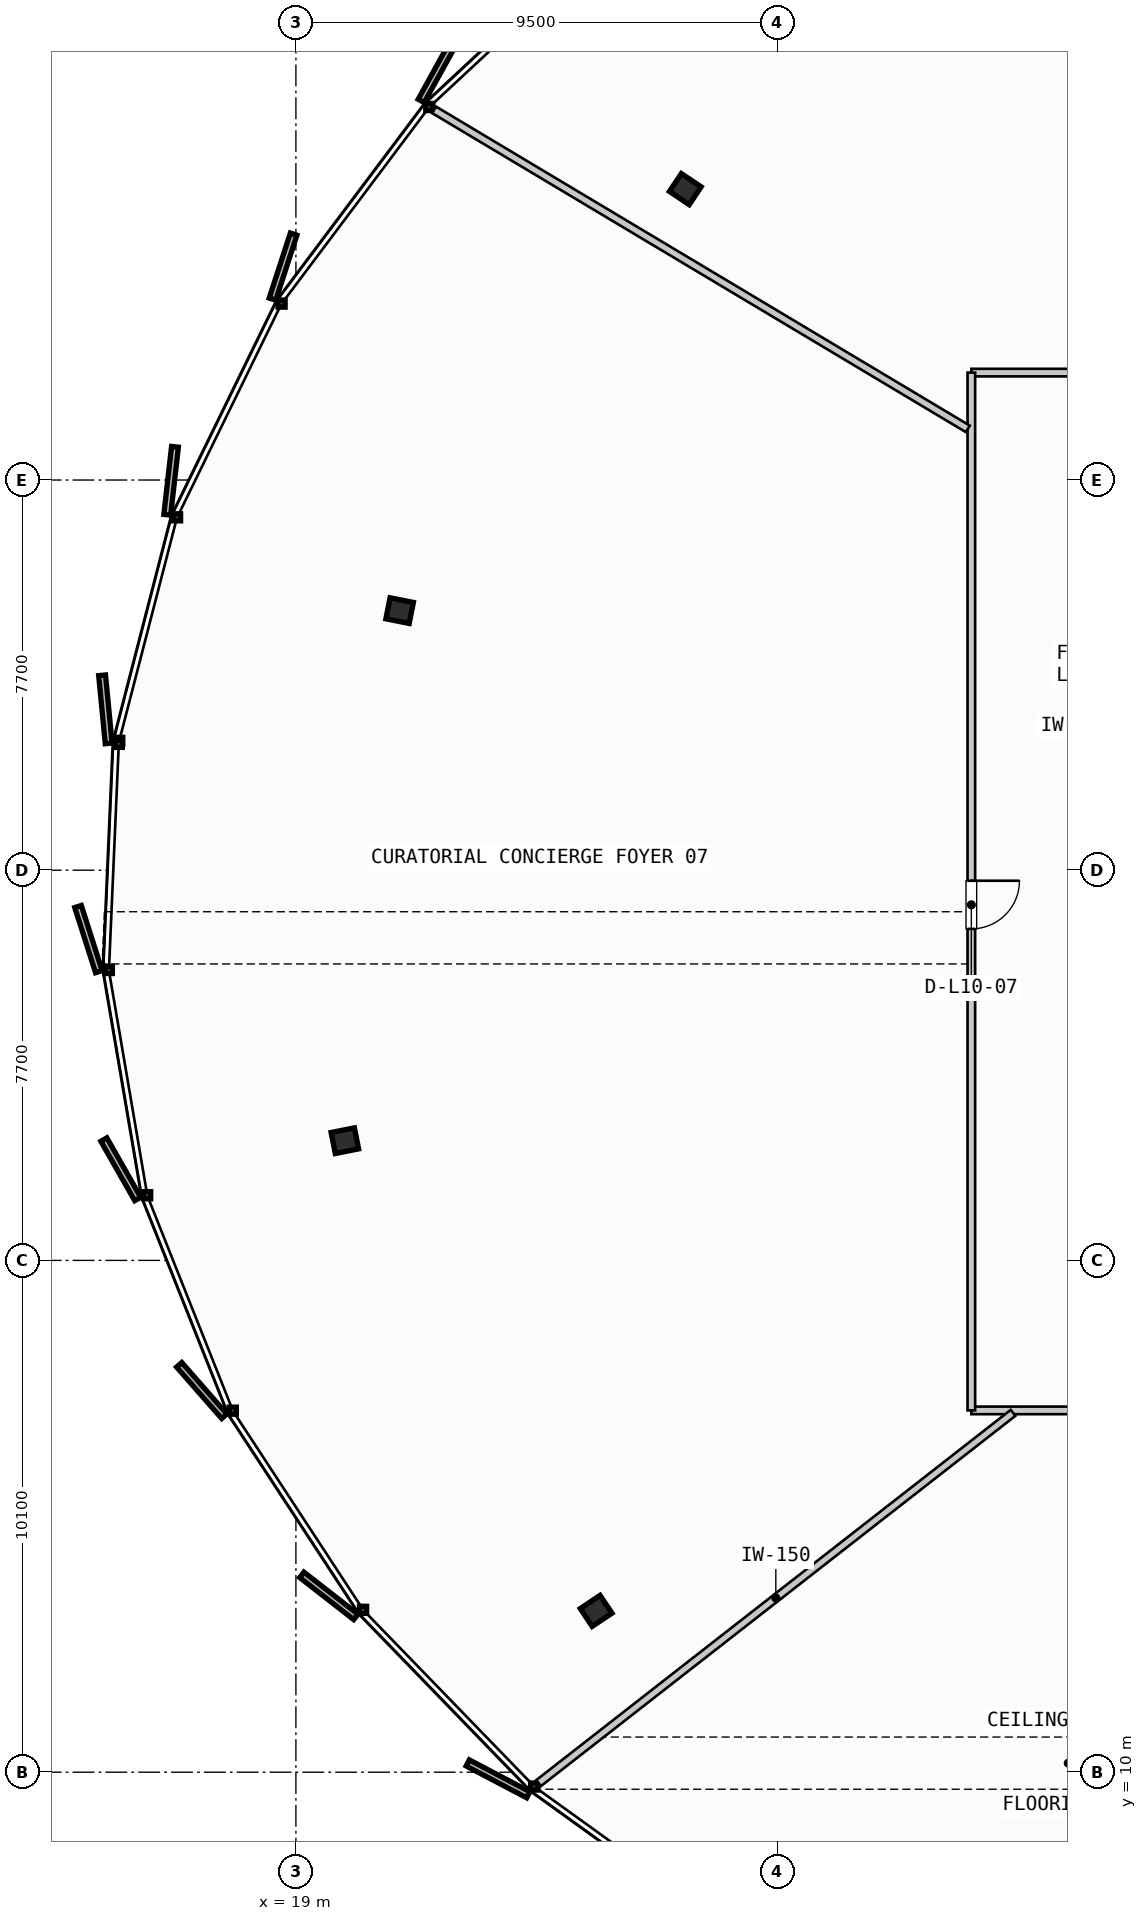
"""IFC4 building model, lengths in metres.
Left out: names, types, materials, properties, quantities, classifications, styles, units other than length and angle.
Written with IfcOpenShell. Run it as: python <this file> out.ifc"""

import sys

from ifc_helpers import new_model, si_unit, direction, frame, frame_2d, origin, origin_2d, place, context, subcontext, project, spatial, rectangle, i_section, extrude, source, transform, mapped, element, fill, save


model = new_model("IFC4")
c1 = context("Model", 3, precision=1e-05, world=origin(), true_north=direction((0.0, 1.0)))
c2 = subcontext(c1, "Body", "Model", "MODEL_VIEW")
j1 = project(units=[si_unit("LENGTHUNIT", "METRE"), si_unit("PLANEANGLEUNIT", "RADIAN")], contexts=[c1])
p1 = place(None, origin())
s1 = spatial("IfcSite", under=j1, at=p1, CompositionType="ELEMENT")
p2 = place(p1, origin())
s2 = spatial("IfcBuilding", under=s1, at=p2, CompositionType="ELEMENT")
p3 = place(p2, frame((0.0, 0.0, 44.8)))
s3 = spatial("IfcBuildingStorey", under=s2, at=p3, CompositionType="ELEMENT", Elevation=44.8)
m1 = source(origin(), c2, "Body", "SweptSolid", [
    extrude(i_section(OverallWidth=0.423, OverallDepth=0.469, WebThickness=0.051, FlangeThickness=0.081, FilletRadius=0.015, at=origin_2d()), origin(), (0.0, 0.0, 1.0), 3.55),
])
for number, where, z_axis, x_axis in (
    (1, (26.685, 41.241, 0.0), (0.0, 0.0, 1.0), (-0.831, 0.556, 0.0)),
    (2, (21.047, 32.923, 0.0), (0.0, 0.0, 1.0), (-0.981, 0.195, 0.0)),
    (3, (19.966, 22.462, 0.0), (0.0, 0.0, 1.0), (-0.981, -0.195, 0.0)),
    (4, (24.925, 13.183, 0.0), (0.0, 0.0, 1.0), (-0.831, -0.556, 0.0)),
):
    element("IfcColumn", number, at=place(p3, frame(where, z_axis=z_axis, x_axis=x_axis)), inside=s3, PredefinedType="COLUMN", context=c2, shape_type="MappedRepresentation", body=[
        mapped(m1, transform((0.0, 0.0, 0.0), scale=1.0)),
    ])
p4 = place(p3, frame((32.33, 17.14, 0.0), z_axis=(0.0, 0.0, 1.0), x_axis=(1.0, 0.0, 0.0)))
e5 = element("IfcWall", 5, at=p4, inside=s3, PredefinedType="PARTITIONING", context=c2, shape_type="SweptSolid", body=[
    extrude(rectangle(XDim=30.5, YDim=0.15, at=frame_2d((15.25, 0.0))), origin(), (0.0, 0.0, 1.0), 2.785),
])
p5 = place(p4, frame((6.316, 0.0, 0.0)))
e6 = element("IfcOpeningElement", 6, at=p5, cuts=e5, PredefinedType="OPENING", context=c2, shape_type="SweptSolid", body=[
    extrude(rectangle(XDim=0.95, YDim=2.15, at=frame_2d((0.475, 1.075))), frame((0.0, 0.085, 0.0), z_axis=(0.0, -1.0, 0.0), x_axis=(1.0, 0.0, 0.0)), (0.0, 0.0, 1.0), 0.17),
])
p6 = place(p4, frame((20.918, 0.0, 0.0)))
e7 = element("IfcOpeningElement", 7, at=p6, cuts=e5, PredefinedType="OPENING", context=c2, shape_type="SweptSolid", body=[
    extrude(rectangle(XDim=0.95, YDim=2.15, at=frame_2d((0.475, 1.075))), frame((0.0, 0.085, 0.0), z_axis=(0.0, -1.0, 0.0), x_axis=(1.0, 0.0, 0.0)), (0.0, 0.0, 1.0), 0.17),
])
p7 = place(p3, frame((62.83, 37.62, 0.0), z_axis=(0.0, 0.0, 1.0), x_axis=(-1.0, 0.0, 0.0)))
e8 = element("IfcWall", 8, at=p7, inside=s3, PredefinedType="PARTITIONING", context=c2, shape_type="SweptSolid", body=[
    extrude(rectangle(XDim=30.5, YDim=0.15, at=frame_2d((15.25, 0.0))), origin(), (0.0, 0.0, 1.0), 2.785),
])
p8 = place(p7, frame((7.089, 0.0, 0.0)))
e9 = element("IfcOpeningElement", 9, at=p8, cuts=e8, PredefinedType="OPENING", context=c2, shape_type="SweptSolid", body=[
    extrude(rectangle(XDim=0.95, YDim=2.15, at=frame_2d((0.475, 1.075))), frame((0.0, 0.085, 0.0), z_axis=(0.0, -1.0, 0.0), x_axis=(1.0, 0.0, 0.0)), (0.0, 0.0, 1.0), 0.17),
])
p9 = place(p7, frame((21.758, 0.0, 0.0)))
e10 = element("IfcOpeningElement", 10, at=p9, cuts=e8, PredefinedType="OPENING", context=c2, shape_type="SweptSolid", body=[
    extrude(rectangle(XDim=0.95, YDim=2.15, at=frame_2d((0.475, 1.075))), frame((0.0, 0.085, 0.0), z_axis=(0.0, -1.0, 0.0), x_axis=(1.0, 0.0, 0.0)), (0.0, 0.0, 1.0), 0.17),
])
p10 = place(p3, frame((32.33, 37.62, 0.0), z_axis=(0.0, 0.0, 1.0), x_axis=(0.0, -1.0, 0.0)))
e11 = element("IfcWall", 11, at=p10, inside=s3, PredefinedType="PARTITIONING", context=c2, shape_type="SweptSolid", body=[
    extrude(rectangle(XDim=20.48, YDim=0.15, at=frame_2d((10.24, 0.0))), origin(), (0.0, 0.0, 1.0), 2.785),
])
p11 = place(p10, frame((10.028, 0.0, 0.0)))
e12 = element("IfcOpeningElement", 12, at=p11, cuts=e11, PredefinedType="OPENING", context=c2, shape_type="SweptSolid", body=[
    extrude(rectangle(XDim=0.95, YDim=2.15, at=frame_2d((0.475, 1.075))), frame((0.0, 0.085, 0.0), z_axis=(0.0, -1.0, 0.0), x_axis=(1.0, 0.0, 0.0)), (0.0, 0.0, 1.0), 0.17),
])
p12 = place(p3, frame((33.153, 17.091, 0.0), z_axis=(0.0, 0.0, 1.0), x_axis=(-0.788396026169, -0.61516803064, 0.0)))
e13 = element("IfcWall", 13, at=p12, inside=s3, PredefinedType="PARTITIONING", context=c2, shape_type="SweptSolid", body=[
    extrude(rectangle(XDim=11.877, YDim=0.15, at=frame_2d((5.938, 0.0))), origin(), (0.0, 0.0, 1.0), 2.785),
])
p13 = place(p3, frame((32.261, 36.509, 0.0), z_axis=(0.0, 0.0, 1.0), x_axis=(-0.858371109645, 0.513029276092, 0.0)))
e14 = element("IfcWall", 14, at=p13, inside=s3, PredefinedType="PARTITIONING", context=c2, shape_type="SweptSolid", body=[
    extrude(rectangle(XDim=12.272, YDim=0.15, at=frame_2d((6.136, 0.0))), origin(), (0.0, 0.0, 1.0), 2.785),
])
m2 = source(origin(), c2, "Body", "SweptSolid", [
    extrude(rectangle(XDim=0.95, YDim=2.15, at=frame_2d((0.475, 1.075))), frame((0.0, 0.025, 0.0), z_axis=(0.0, -1.0, 0.0), x_axis=(1.0, 0.0, 0.0)), (0.0, 0.0, 1.0), 0.05),
])
p14 = place(p11, origin())
e15 = element("IfcDoor", 15, at=p14, inside=s3, OperationType="SINGLE_SWING_LEFT", PredefinedType="DOOR", context=c2, shape_type="MappedRepresentation", body=[
    mapped(m2, transform((0.0, 0.0, 0.0), scale=1.0)),
])
fill(e12, e15)
save(model, sys.argv[1])
